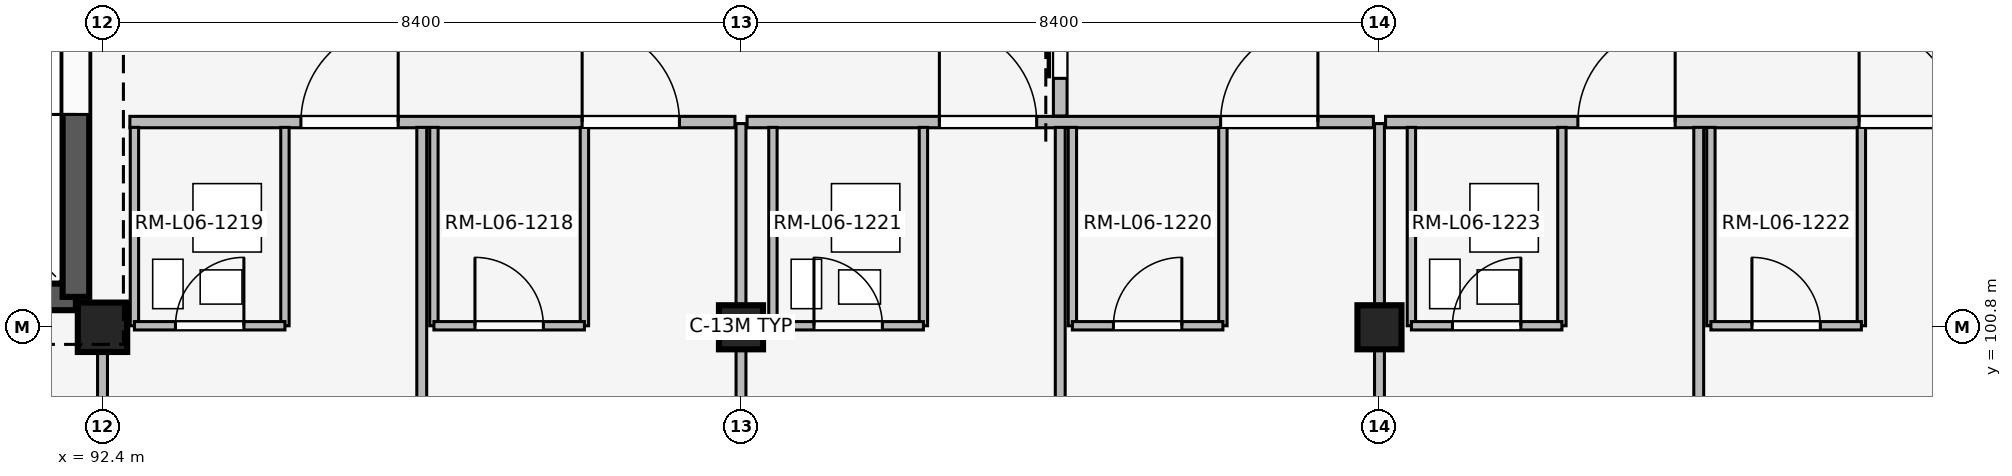
"""IFC4 building model, lengths in metres.
Left out: names, types, materials, properties, quantities, classifications, styles, units other than length and angle.
Written with IfcOpenShell. Run it as: python <this file> out.ifc"""

import sys

from ifc_helpers import new_model, si_unit, direction, frame, frame_2d, origin, origin_2d, place, context, subcontext, project, spatial, rectangle, extrude, element, fill, save


model = new_model("IFC4")
c1 = context("Model", 3, precision=1e-05, world=origin(), true_north=direction((0.0, 1.0)))
c2 = subcontext(c1, "Body", "Model", "MODEL_VIEW")
j1 = project(units=[si_unit("LENGTHUNIT", "METRE"), si_unit("PLANEANGLEUNIT", "RADIAN")], contexts=[c1])
p1 = place(None, origin())
s1 = spatial("IfcSite", under=j1, at=p1, CompositionType="ELEMENT")
p2 = place(p1, origin())
s2 = spatial("IfcBuilding", under=s1, at=p2, CompositionType="ELEMENT")
p3 = place(p2, frame((0.0, 0.0, 24.6)))
s3 = spatial("IfcBuildingStorey", under=s2, at=p3, CompositionType="ELEMENT", Elevation=24.6)
p4 = place(p3, frame((92.4, 100.8, 0.0), z_axis=(0.0, 0.0, 1.0), x_axis=(1.0, 0.0, 0.0)))
e1 = element("IfcColumn", 1, at=p4, inside=s3, PredefinedType="COLUMN", context=c2, shape_type="SweptSolid", body=[
    extrude(rectangle(XDim=0.65, YDim=0.65, at=origin_2d()), origin(), (0.0, 0.0, 1.0), 4.2),
])
for number, where, z_axis, x_axis in (
    (2, (100.8, 100.8, 0.0), (0.0, 0.0, 1.0), (1.0, 0.0, 0.0)),
    (3, (109.2, 100.8, 0.0), (0.0, 0.0, 1.0), (1.0, 0.0, 0.0)),
):
    element("IfcColumn", number, at=place(p3, frame(where, z_axis=z_axis, x_axis=x_axis)), inside=s3, PredefinedType="COLUMN", context=c2, shape_type="SweptSolid", body=[
        extrude(rectangle(XDim=0.58, YDim=0.58, at=origin_2d()), origin(), (0.0, 0.0, 1.0), 4.2),
    ])
p5 = place(p3, frame((84.55, 101.2, 0.0), z_axis=(0.0, 0.0, 1.0), x_axis=(1.0, 0.0, 0.0)))
e4 = element("IfcWall", 4, at=p5, inside=s3, PredefinedType="SHEAR", context=c2, shape_type="SweptSolid", body=[
    extrude(rectangle(XDim=7.5, YDim=0.35, at=frame_2d((3.75, 0.0))), origin(), (0.0, 0.0, 1.0), 3.92),
])
p6 = place(p5, frame((4.85, 0.0, 0.0)))
e5 = element("IfcOpeningElement", 5, at=p6, cuts=e4, PredefinedType="OPENING", context=c2, shape_type="SweptSolid", body=[
    extrude(rectangle(XDim=1.2, YDim=2.2, at=frame_2d((0.6, 1.1))), frame((0.0, 0.185, 0.0), z_axis=(0.0, -1.0, 0.0), x_axis=(1.0, 0.0, 0.0)), (0.0, 0.0, 1.0), 0.37),
])
p7 = place(p3, frame((92.05, 101.2, 0.0), z_axis=(0.0, 0.0, 1.0), x_axis=(0.0, 1.0, 0.0)))
e6 = element("IfcWall", 6, at=p7, inside=s3, PredefinedType="SHEAR", context=c2, shape_type="SweptSolid", body=[
    extrude(rectangle(XDim=7.55, YDim=0.35, at=frame_2d((3.775, 0.0))), origin(), (0.0, 0.0, 1.0), 3.92),
])
p8 = place(p7, frame((2.4, 0.0, 0.0)))
e7 = element("IfcOpeningElement", 7, at=p8, cuts=e6, PredefinedType="OPENING", context=c2, shape_type="SweptSolid", body=[
    extrude(rectangle(XDim=1.2, YDim=2.2, at=frame_2d((0.6, 1.1))), frame((0.0, 0.185, 0.0), z_axis=(0.0, -1.0, 0.0), x_axis=(1.0, 0.0, 0.0)), (0.0, 0.0, 1.0), 0.37),
])
p9 = place(p3, frame((92.4, 92.54, 0.0), z_axis=(0.0, 0.0, 1.0), x_axis=(0.0, 1.0, 0.0)))
e8 = element("IfcWall", 8, at=p9, inside=s3, PredefinedType="PARTITIONING", context=c2, shape_type="SweptSolid", body=[
    extrude(rectangle(XDim=8.21, YDim=0.13, at=frame_2d((4.105, 0.0))), origin(), (0.0, 0.0, 1.0), 3.32),
])
p10 = place(p9, frame((3.64, 0.0, 0.0)))
e9 = element("IfcOpeningElement", 9, at=p10, cuts=e8, PredefinedType="OPENING", context=c2, shape_type="SweptSolid", body=[
    extrude(rectangle(XDim=1.08, YDim=2.15, at=frame_2d((0.54, 1.075))), frame((0.0, 0.075, 0.0), z_axis=(0.0, -1.0, 0.0), x_axis=(1.0, 0.0, 0.0)), (0.0, 0.0, 1.0), 0.15),
])
p11 = place(p3, frame((92.76, 103.5, 0.0), z_axis=(0.0, 0.0, 1.0), x_axis=(1.0, 0.0, 0.0)))
e10 = element("IfcWall", 10, at=p11, inside=s3, PredefinedType="PARTITIONING", context=c2, shape_type="SweptSolid", body=[
    extrude(rectangle(XDim=7.96, YDim=0.15, at=frame_2d((3.98, 0.0))), origin(), (0.0, 0.0, 1.0), 3.32),
])
p12 = place(p11, frame((2.25, 0.0, 0.0)))
e11 = element("IfcOpeningElement", 11, at=p12, cuts=e10, PredefinedType="OPENING", context=c2, shape_type="SweptSolid", body=[
    extrude(rectangle(XDim=1.28, YDim=2.2, at=frame_2d((0.64, 1.1))), frame((0.0, 0.085, 0.0), z_axis=(0.0, -1.0, 0.0), x_axis=(1.0, 0.0, 0.0)), (0.0, 0.0, 1.0), 0.17),
])
p13 = place(p11, frame((5.95, 0.0, 0.0)))
e12 = element("IfcOpeningElement", 12, at=p13, cuts=e10, PredefinedType="OPENING", context=c2, shape_type="SweptSolid", body=[
    extrude(rectangle(XDim=1.28, YDim=2.2, at=frame_2d((0.64, 1.1))), frame((0.0, 0.085, 0.0), z_axis=(0.0, -1.0, 0.0), x_axis=(1.0, 0.0, 0.0)), (0.0, 0.0, 1.0), 0.17),
])
p14 = place(p3, frame((96.6, 92.5, 0.0), z_axis=(0.0, 0.0, 1.0), x_axis=(0.0, 1.0, 0.0)))
e13 = element("IfcWall", 13, at=p14, inside=s3, PredefinedType="PARTITIONING", context=c2, shape_type="SweptSolid", body=[
    extrude(rectangle(XDim=10.93, YDim=0.13, at=frame_2d((5.465, 0.0))), origin(), (0.0, 0.0, 1.0), 3.32),
])
for number, where, z_axis, x_axis in (
    (14, (92.82, 100.82, 0.0), (0.0, 0.0, 1.0), (0.0, 1.0, 0.0)),
    (15, (94.8, 100.82, 0.0), (0.0, 0.0, 1.0), (0.0, 1.0, 0.0)),
):
    element("IfcWall", number, at=place(p3, frame(where, z_axis=z_axis, x_axis=x_axis)), inside=s3, PredefinedType="PARTITIONING", context=c2, shape_type="SweptSolid", body=[
        extrude(rectangle(XDim=2.61, YDim=0.11, at=frame_2d((1.305, 0.0))), origin(), (0.0, 0.0, 1.0), 3.32),
    ])
p15 = place(p3, frame((92.82, 100.82, 0.0), z_axis=(0.0, 0.0, 1.0), x_axis=(1.0, 0.0, 0.0)))
e16 = element("IfcWall", 16, at=p15, inside=s3, PredefinedType="PARTITIONING", context=c2, shape_type="SweptSolid", body=[
    extrude(rectangle(XDim=1.98, YDim=0.11, at=frame_2d((0.99, 0.0))), origin(), (0.0, 0.0, 1.0), 3.32),
])
p16 = place(p15, frame((0.54, 0.0, 0.0)))
e17 = element("IfcOpeningElement", 17, at=p16, cuts=e16, PredefinedType="OPENING", context=c2, shape_type="SweptSolid", body=[
    extrude(rectangle(XDim=0.9, YDim=2.1, at=frame_2d((0.45, 1.05))), frame((0.0, 0.065, 0.0), z_axis=(0.0, -1.0, 0.0), x_axis=(1.0, 0.0, 0.0)), (0.0, 0.0, 1.0), 0.13),
])
for number, where, z_axis, x_axis in (
    (18, (96.76, 100.82, 0.0), (0.0, 0.0, 1.0), (0.0, 1.0, 0.0)),
    (19, (98.74, 100.82, 0.0), (0.0, 0.0, 1.0), (0.0, 1.0, 0.0)),
):
    element("IfcWall", number, at=place(p3, frame(where, z_axis=z_axis, x_axis=x_axis)), inside=s3, PredefinedType="PARTITIONING", context=c2, shape_type="SweptSolid", body=[
        extrude(rectangle(XDim=2.61, YDim=0.11, at=frame_2d((1.305, 0.0))), origin(), (0.0, 0.0, 1.0), 3.32),
    ])
p17 = place(p3, frame((96.76, 100.82, 0.0), z_axis=(0.0, 0.0, 1.0), x_axis=(1.0, 0.0, 0.0)))
e20 = element("IfcWall", 20, at=p17, inside=s3, PredefinedType="PARTITIONING", context=c2, shape_type="SweptSolid", body=[
    extrude(rectangle(XDim=1.98, YDim=0.11, at=frame_2d((0.99, 0.0))), origin(), (0.0, 0.0, 1.0), 3.32),
])
p18 = place(p17, frame((0.54, 0.0, 0.0)))
e21 = element("IfcOpeningElement", 21, at=p18, cuts=e20, PredefinedType="OPENING", context=c2, shape_type="SweptSolid", body=[
    extrude(rectangle(XDim=0.9, YDim=2.1, at=frame_2d((0.45, 1.05))), frame((0.0, 0.065, 0.0), z_axis=(0.0, -1.0, 0.0), x_axis=(1.0, 0.0, 0.0)), (0.0, 0.0, 1.0), 0.13),
])
p19 = place(p3, frame((100.8, 92.54, 0.0), z_axis=(0.0, 0.0, 1.0), x_axis=(0.0, 1.0, 0.0)))
e22 = element("IfcWall", 22, at=p19, inside=s3, PredefinedType="PARTITIONING", context=c2, shape_type="SweptSolid", body=[
    extrude(rectangle(XDim=10.94, YDim=0.13, at=frame_2d((5.47, 0.0))), origin(), (0.0, 0.0, 1.0), 3.32),
])
p20 = place(p3, frame((100.88, 103.5, 0.0), z_axis=(0.0, 0.0, 1.0), x_axis=(1.0, 0.0, 0.0)))
e23 = element("IfcWall", 23, at=p20, inside=s3, PredefinedType="PARTITIONING", context=c2, shape_type="SweptSolid", body=[
    extrude(rectangle(XDim=8.24, YDim=0.15, at=frame_2d((4.12, 0.0))), origin(), (0.0, 0.0, 1.0), 3.32),
])
p21 = place(p20, frame((2.53, 0.0, 0.0)))
e24 = element("IfcOpeningElement", 24, at=p21, cuts=e23, PredefinedType="OPENING", context=c2, shape_type="SweptSolid", body=[
    extrude(rectangle(XDim=1.28, YDim=2.2, at=frame_2d((0.64, 1.1))), frame((0.0, 0.085, 0.0), z_axis=(0.0, -1.0, 0.0), x_axis=(1.0, 0.0, 0.0)), (0.0, 0.0, 1.0), 0.17),
])
p22 = place(p20, frame((6.23, 0.0, 0.0)))
e25 = element("IfcOpeningElement", 25, at=p22, cuts=e23, PredefinedType="OPENING", context=c2, shape_type="SweptSolid", body=[
    extrude(rectangle(XDim=1.28, YDim=2.2, at=frame_2d((0.64, 1.1))), frame((0.0, 0.085, 0.0), z_axis=(0.0, -1.0, 0.0), x_axis=(1.0, 0.0, 0.0)), (0.0, 0.0, 1.0), 0.17),
])
p23 = place(p3, frame((105.0, 92.5, 0.0), z_axis=(0.0, 0.0, 1.0), x_axis=(0.0, 1.0, 0.0)))
e26 = element("IfcWall", 26, at=p23, inside=s3, PredefinedType="PARTITIONING", context=c2, shape_type="SweptSolid", body=[
    extrude(rectangle(XDim=10.93, YDim=0.13, at=frame_2d((5.465, 0.0))), origin(), (0.0, 0.0, 1.0), 3.32),
])
for number, where, z_axis, x_axis in (
    (27, (101.22, 100.82, 0.0), (0.0, 0.0, 1.0), (0.0, 1.0, 0.0)),
    (28, (103.2, 100.82, 0.0), (0.0, 0.0, 1.0), (0.0, 1.0, 0.0)),
):
    element("IfcWall", number, at=place(p3, frame(where, z_axis=z_axis, x_axis=x_axis)), inside=s3, PredefinedType="PARTITIONING", context=c2, shape_type="SweptSolid", body=[
        extrude(rectangle(XDim=2.61, YDim=0.11, at=frame_2d((1.305, 0.0))), origin(), (0.0, 0.0, 1.0), 3.32),
    ])
p24 = place(p3, frame((101.22, 100.82, 0.0), z_axis=(0.0, 0.0, 1.0), x_axis=(1.0, 0.0, 0.0)))
e29 = element("IfcWall", 29, at=p24, inside=s3, PredefinedType="PARTITIONING", context=c2, shape_type="SweptSolid", body=[
    extrude(rectangle(XDim=1.98, YDim=0.11, at=frame_2d((0.99, 0.0))), origin(), (0.0, 0.0, 1.0), 3.32),
])
p25 = place(p24, frame((0.54, 0.0, 0.0)))
e30 = element("IfcOpeningElement", 30, at=p25, cuts=e29, PredefinedType="OPENING", context=c2, shape_type="SweptSolid", body=[
    extrude(rectangle(XDim=0.9, YDim=2.1, at=frame_2d((0.45, 1.05))), frame((0.0, 0.065, 0.0), z_axis=(0.0, -1.0, 0.0), x_axis=(1.0, 0.0, 0.0)), (0.0, 0.0, 1.0), 0.13),
])
for number, where, z_axis, x_axis in (
    (31, (105.16, 100.82, 0.0), (0.0, 0.0, 1.0), (0.0, 1.0, 0.0)),
    (32, (107.14, 100.82, 0.0), (0.0, 0.0, 1.0), (0.0, 1.0, 0.0)),
):
    element("IfcWall", number, at=place(p3, frame(where, z_axis=z_axis, x_axis=x_axis)), inside=s3, PredefinedType="PARTITIONING", context=c2, shape_type="SweptSolid", body=[
        extrude(rectangle(XDim=2.61, YDim=0.11, at=frame_2d((1.305, 0.0))), origin(), (0.0, 0.0, 1.0), 3.32),
    ])
p26 = place(p3, frame((105.16, 100.82, 0.0), z_axis=(0.0, 0.0, 1.0), x_axis=(1.0, 0.0, 0.0)))
e33 = element("IfcWall", 33, at=p26, inside=s3, PredefinedType="PARTITIONING", context=c2, shape_type="SweptSolid", body=[
    extrude(rectangle(XDim=1.98, YDim=0.11, at=frame_2d((0.99, 0.0))), origin(), (0.0, 0.0, 1.0), 3.32),
])
p27 = place(p26, frame((0.54, 0.0, 0.0)))
e34 = element("IfcOpeningElement", 34, at=p27, cuts=e33, PredefinedType="OPENING", context=c2, shape_type="SweptSolid", body=[
    extrude(rectangle(XDim=0.9, YDim=2.1, at=frame_2d((0.45, 1.05))), frame((0.0, 0.065, 0.0), z_axis=(0.0, -1.0, 0.0), x_axis=(1.0, 0.0, 0.0)), (0.0, 0.0, 1.0), 0.13),
])
p28 = place(p3, frame((105.0, 103.58, 0.0), z_axis=(0.0, 0.0, 1.0), x_axis=(0.0, 1.0, 0.0)))
e35 = element("IfcWall", 35, at=p28, inside=s3, PredefinedType="PARTITIONING", context=c2, shape_type="SweptSolid", body=[
    extrude(rectangle(XDim=2.84, YDim=0.18, at=frame_2d((1.42, 0.0))), origin(), (0.0, 0.0, 1.0), 3.32),
])
p29 = place(p28, frame((0.495, 0.0, 0.0)))
e36 = element("IfcOpeningElement", 36, at=p29, cuts=e35, PredefinedType="OPENING", context=c2, shape_type="SweptSolid", body=[
    extrude(rectangle(XDim=1.85, YDim=2.3, at=frame_2d((0.925, 1.15))), frame((0.0, 0.1, 0.0), z_axis=(0.0, -1.0, 0.0), x_axis=(1.0, 0.0, 0.0)), (0.0, 0.0, 1.0), 0.2),
])
p30 = place(p3, frame((109.2, 92.54, 0.0), z_axis=(0.0, 0.0, 1.0), x_axis=(0.0, 1.0, 0.0)))
e37 = element("IfcWall", 37, at=p30, inside=s3, PredefinedType="PARTITIONING", context=c2, shape_type="SweptSolid", body=[
    extrude(rectangle(XDim=10.94, YDim=0.13, at=frame_2d((5.47, 0.0))), origin(), (0.0, 0.0, 1.0), 3.32),
])
p31 = place(p3, frame((109.28, 103.5, 0.0), z_axis=(0.0, 0.0, 1.0), x_axis=(1.0, 0.0, 0.0)))
e38 = element("IfcWall", 38, at=p31, inside=s3, PredefinedType="PARTITIONING", context=c2, shape_type="SweptSolid", body=[
    extrude(rectangle(XDim=8.24, YDim=0.15, at=frame_2d((4.12, 0.0))), origin(), (0.0, 0.0, 1.0), 3.32),
])
p32 = place(p31, frame((2.53, 0.0, 0.0)))
e39 = element("IfcOpeningElement", 39, at=p32, cuts=e38, PredefinedType="OPENING", context=c2, shape_type="SweptSolid", body=[
    extrude(rectangle(XDim=1.28, YDim=2.2, at=frame_2d((0.64, 1.1))), frame((0.0, 0.085, 0.0), z_axis=(0.0, -1.0, 0.0), x_axis=(1.0, 0.0, 0.0)), (0.0, 0.0, 1.0), 0.17),
])
p33 = place(p31, frame((6.23, 0.0, 0.0)))
e40 = element("IfcOpeningElement", 40, at=p33, cuts=e38, PredefinedType="OPENING", context=c2, shape_type="SweptSolid", body=[
    extrude(rectangle(XDim=1.28, YDim=2.2, at=frame_2d((0.64, 1.1))), frame((0.0, 0.085, 0.0), z_axis=(0.0, -1.0, 0.0), x_axis=(1.0, 0.0, 0.0)), (0.0, 0.0, 1.0), 0.17),
])
p34 = place(p3, frame((113.4, 92.5, 0.0), z_axis=(0.0, 0.0, 1.0), x_axis=(0.0, 1.0, 0.0)))
e41 = element("IfcWall", 41, at=p34, inside=s3, PredefinedType="PARTITIONING", context=c2, shape_type="SweptSolid", body=[
    extrude(rectangle(XDim=10.93, YDim=0.13, at=frame_2d((5.465, 0.0))), origin(), (0.0, 0.0, 1.0), 3.32),
])
for number, where, z_axis, x_axis in (
    (42, (109.62, 100.82, 0.0), (0.0, 0.0, 1.0), (0.0, 1.0, 0.0)),
    (43, (111.6, 100.82, 0.0), (0.0, 0.0, 1.0), (0.0, 1.0, 0.0)),
):
    element("IfcWall", number, at=place(p3, frame(where, z_axis=z_axis, x_axis=x_axis)), inside=s3, PredefinedType="PARTITIONING", context=c2, shape_type="SweptSolid", body=[
        extrude(rectangle(XDim=2.61, YDim=0.11, at=frame_2d((1.305, 0.0))), origin(), (0.0, 0.0, 1.0), 3.32),
    ])
p35 = place(p3, frame((109.62, 100.82, 0.0), z_axis=(0.0, 0.0, 1.0), x_axis=(1.0, 0.0, 0.0)))
e44 = element("IfcWall", 44, at=p35, inside=s3, PredefinedType="PARTITIONING", context=c2, shape_type="SweptSolid", body=[
    extrude(rectangle(XDim=1.98, YDim=0.11, at=frame_2d((0.99, 0.0))), origin(), (0.0, 0.0, 1.0), 3.32),
])
p36 = place(p35, frame((0.54, 0.0, 0.0)))
e45 = element("IfcOpeningElement", 45, at=p36, cuts=e44, PredefinedType="OPENING", context=c2, shape_type="SweptSolid", body=[
    extrude(rectangle(XDim=0.9, YDim=2.1, at=frame_2d((0.45, 1.05))), frame((0.0, 0.065, 0.0), z_axis=(0.0, -1.0, 0.0), x_axis=(1.0, 0.0, 0.0)), (0.0, 0.0, 1.0), 0.13),
])
for number, where, z_axis, x_axis in (
    (46, (113.56, 100.82, 0.0), (0.0, 0.0, 1.0), (0.0, 1.0, 0.0)),
    (47, (115.54, 100.82, 0.0), (0.0, 0.0, 1.0), (0.0, 1.0, 0.0)),
):
    element("IfcWall", number, at=place(p3, frame(where, z_axis=z_axis, x_axis=x_axis)), inside=s3, PredefinedType="PARTITIONING", context=c2, shape_type="SweptSolid", body=[
        extrude(rectangle(XDim=2.61, YDim=0.11, at=frame_2d((1.305, 0.0))), origin(), (0.0, 0.0, 1.0), 3.32),
    ])
p37 = place(p3, frame((113.56, 100.82, 0.0), z_axis=(0.0, 0.0, 1.0), x_axis=(1.0, 0.0, 0.0)))
e48 = element("IfcWall", 48, at=p37, inside=s3, PredefinedType="PARTITIONING", context=c2, shape_type="SweptSolid", body=[
    extrude(rectangle(XDim=1.98, YDim=0.11, at=frame_2d((0.99, 0.0))), origin(), (0.0, 0.0, 1.0), 3.32),
])
p38 = place(p37, frame((0.54, 0.0, 0.0)))
e49 = element("IfcOpeningElement", 49, at=p38, cuts=e48, PredefinedType="OPENING", context=c2, shape_type="SweptSolid", body=[
    extrude(rectangle(XDim=0.9, YDim=2.1, at=frame_2d((0.45, 1.05))), frame((0.0, 0.065, 0.0), z_axis=(0.0, -1.0, 0.0), x_axis=(1.0, 0.0, 0.0)), (0.0, 0.0, 1.0), 0.13),
])
p39 = place(p8, origin())
e50 = element("IfcDoor", 50, at=p39, inside=s3, OperationType="SINGLE_SWING_LEFT", PredefinedType="DOOR", context=c2, shape_type="SweptSolid", body=[
    extrude(rectangle(XDim=1.2, YDim=2.2, at=frame_2d((0.6, 1.1))), frame((0.0, 0.025, 0.0), z_axis=(0.0, -1.0, 0.0), x_axis=(1.0, 0.0, 0.0)), (0.0, 0.0, 1.0), 0.05),
])
fill(e7, e50)
p40 = place(p12, origin())
e51 = element("IfcDoor", 51, at=p40, inside=s3, OperationType="SINGLE_SWING_RIGHT", PredefinedType="DOOR", context=c2, shape_type="SweptSolid", body=[
    extrude(rectangle(XDim=1.28, YDim=2.2, at=frame_2d((0.64, 1.1))), frame((0.0, 0.025, 0.0), z_axis=(0.0, -1.0, 0.0), x_axis=(1.0, 0.0, 0.0)), (0.0, 0.0, 1.0), 0.05),
])
fill(e11, e51)
p41 = place(p13, origin())
e52 = element("IfcDoor", 52, at=p41, inside=s3, OperationType="SINGLE_SWING_LEFT", PredefinedType="DOOR", context=c2, shape_type="SweptSolid", body=[
    extrude(rectangle(XDim=1.28, YDim=2.2, at=frame_2d((0.64, 1.1))), frame((0.0, 0.025, 0.0), z_axis=(0.0, -1.0, 0.0), x_axis=(1.0, 0.0, 0.0)), (0.0, 0.0, 1.0), 0.05),
])
fill(e12, e52)
p42 = place(p16, origin())
e53 = element("IfcDoor", 53, at=p42, inside=s3, OperationType="SINGLE_SWING_RIGHT", PredefinedType="DOOR", context=c2, shape_type="SweptSolid", body=[
    extrude(rectangle(XDim=0.9, YDim=2.1, at=frame_2d((0.45, 1.05))), frame((0.0, 0.025, 0.0), z_axis=(0.0, -1.0, 0.0), x_axis=(1.0, 0.0, 0.0)), (0.0, 0.0, 1.0), 0.05),
])
fill(e17, e53)
p43 = place(p18, origin())
e54 = element("IfcDoor", 54, at=p43, inside=s3, OperationType="SINGLE_SWING_LEFT", PredefinedType="DOOR", context=c2, shape_type="SweptSolid", body=[
    extrude(rectangle(XDim=0.9, YDim=2.1, at=frame_2d((0.45, 1.05))), frame((0.0, 0.025, 0.0), z_axis=(0.0, -1.0, 0.0), x_axis=(1.0, 0.0, 0.0)), (0.0, 0.0, 1.0), 0.05),
])
fill(e21, e54)
p44 = place(p21, origin())
e55 = element("IfcDoor", 55, at=p44, inside=s3, OperationType="SINGLE_SWING_LEFT", PredefinedType="DOOR", context=c2, shape_type="SweptSolid", body=[
    extrude(rectangle(XDim=1.28, YDim=2.2, at=frame_2d((0.64, 1.1))), frame((0.0, 0.025, 0.0), z_axis=(0.0, -1.0, 0.0), x_axis=(1.0, 0.0, 0.0)), (0.0, 0.0, 1.0), 0.05),
])
fill(e24, e55)
p45 = place(p22, origin())
e56 = element("IfcDoor", 56, at=p45, inside=s3, OperationType="SINGLE_SWING_RIGHT", PredefinedType="DOOR", context=c2, shape_type="SweptSolid", body=[
    extrude(rectangle(XDim=1.28, YDim=2.2, at=frame_2d((0.64, 1.1))), frame((0.0, 0.025, 0.0), z_axis=(0.0, -1.0, 0.0), x_axis=(1.0, 0.0, 0.0)), (0.0, 0.0, 1.0), 0.05),
])
fill(e25, e56)
p46 = place(p25, origin())
e57 = element("IfcDoor", 57, at=p46, inside=s3, OperationType="SINGLE_SWING_LEFT", PredefinedType="DOOR", context=c2, shape_type="SweptSolid", body=[
    extrude(rectangle(XDim=0.9, YDim=2.1, at=frame_2d((0.45, 1.05))), frame((0.0, 0.025, 0.0), z_axis=(0.0, -1.0, 0.0), x_axis=(1.0, 0.0, 0.0)), (0.0, 0.0, 1.0), 0.05),
])
fill(e30, e57)
p47 = place(p27, origin())
e58 = element("IfcDoor", 58, at=p47, inside=s3, OperationType="SINGLE_SWING_RIGHT", PredefinedType="DOOR", context=c2, shape_type="SweptSolid", body=[
    extrude(rectangle(XDim=0.9, YDim=2.1, at=frame_2d((0.45, 1.05))), frame((0.0, 0.025, 0.0), z_axis=(0.0, -1.0, 0.0), x_axis=(1.0, 0.0, 0.0)), (0.0, 0.0, 1.0), 0.05),
])
fill(e34, e58)
p48 = place(p29, origin())
e59 = element("IfcDoor", 59, at=p48, inside=s3, OperationType="SLIDING_TO_LEFT", PredefinedType="DOOR", context=c2, shape_type="SweptSolid", body=[
    extrude(rectangle(XDim=1.85, YDim=2.3, at=frame_2d((0.925, 1.15))), frame((0.0, 0.025, 0.0), z_axis=(0.0, -1.0, 0.0), x_axis=(1.0, 0.0, 0.0)), (0.0, 0.0, 1.0), 0.05),
])
fill(e36, e59)
p49 = place(p32, origin())
e60 = element("IfcDoor", 60, at=p49, inside=s3, OperationType="SINGLE_SWING_RIGHT", PredefinedType="DOOR", context=c2, shape_type="SweptSolid", body=[
    extrude(rectangle(XDim=1.28, YDim=2.2, at=frame_2d((0.64, 1.1))), frame((0.0, 0.025, 0.0), z_axis=(0.0, -1.0, 0.0), x_axis=(1.0, 0.0, 0.0)), (0.0, 0.0, 1.0), 0.05),
])
fill(e39, e60)
p50 = place(p33, origin())
e61 = element("IfcDoor", 61, at=p50, inside=s3, OperationType="SINGLE_SWING_LEFT", PredefinedType="DOOR", context=c2, shape_type="SweptSolid", body=[
    extrude(rectangle(XDim=1.28, YDim=2.2, at=frame_2d((0.64, 1.1))), frame((0.0, 0.025, 0.0), z_axis=(0.0, -1.0, 0.0), x_axis=(1.0, 0.0, 0.0)), (0.0, 0.0, 1.0), 0.05),
])
fill(e40, e61)
p51 = place(p36, origin())
e62 = element("IfcDoor", 62, at=p51, inside=s3, OperationType="SINGLE_SWING_RIGHT", PredefinedType="DOOR", context=c2, shape_type="SweptSolid", body=[
    extrude(rectangle(XDim=0.9, YDim=2.1, at=frame_2d((0.45, 1.05))), frame((0.0, 0.025, 0.0), z_axis=(0.0, -1.0, 0.0), x_axis=(1.0, 0.0, 0.0)), (0.0, 0.0, 1.0), 0.05),
])
fill(e45, e62)
p52 = place(p38, origin())
e63 = element("IfcDoor", 63, at=p52, inside=s3, OperationType="SINGLE_SWING_LEFT", PredefinedType="DOOR", context=c2, shape_type="SweptSolid", body=[
    extrude(rectangle(XDim=0.9, YDim=2.1, at=frame_2d((0.45, 1.05))), frame((0.0, 0.025, 0.0), z_axis=(0.0, -1.0, 0.0), x_axis=(1.0, 0.0, 0.0)), (0.0, 0.0, 1.0), 0.05),
])
fill(e49, e63)
save(model, sys.argv[1])
